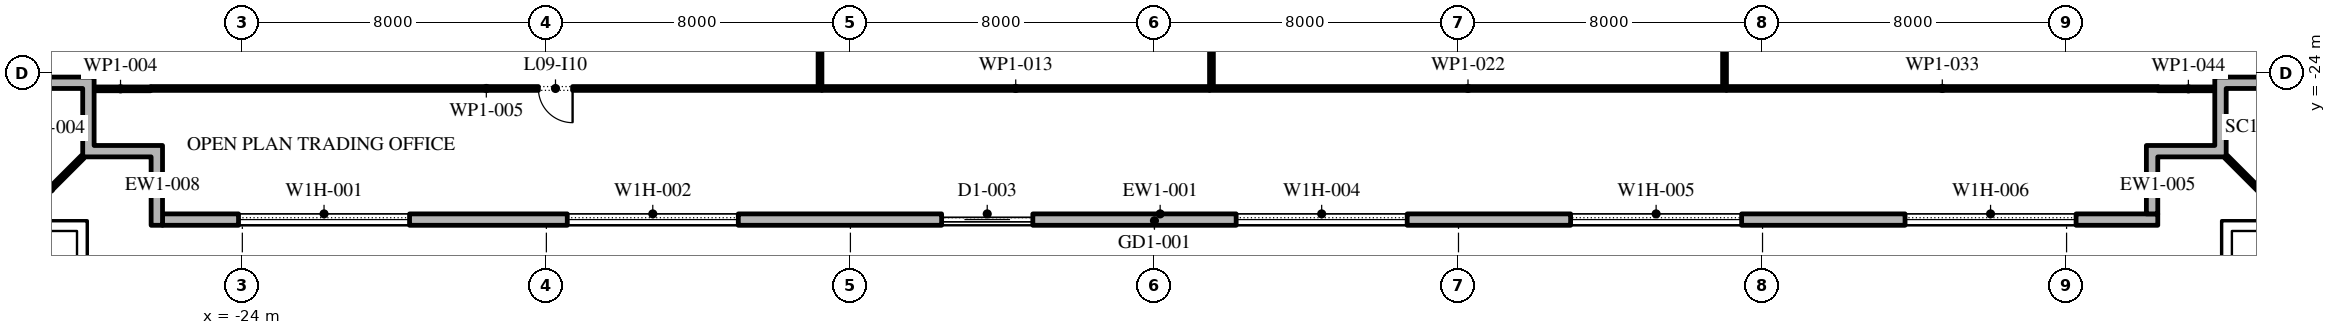
"""IFC4 building model, lengths in metres.
Left out: names, types, materials, properties, quantities, classifications, styles, units other than length and angle.
Written with IfcOpenShell. Run it as: python <this file> out.ifc"""

import sys

from ifc_helpers import new_model, si_unit, direction, frame, frame_2d, origin, place, context, subcontext, project, spatial, polyline, rectangle, outline, extrude, element, fill, save


model = new_model("IFC4")
c1 = context("Model", 3, precision=1e-05, world=origin(), true_north=direction((0.0, 1.0)))
c2 = subcontext(c1, "Body", "Model", "MODEL_VIEW")
j1 = project(units=[si_unit("LENGTHUNIT", "METRE"), si_unit("PLANEANGLEUNIT", "RADIAN")], contexts=[c1])
p1 = place(None, origin())
s1 = spatial("IfcSite", under=j1, at=p1, CompositionType="ELEMENT")
p2 = place(p1, origin())
s2 = spatial("IfcBuilding", under=s1, at=p2, CompositionType="ELEMENT")
p3 = place(p2, frame((0.0, 0.0, 48.0)))
s3 = spatial("IfcBuildingStorey", under=s2, at=p3, CompositionType="ELEMENT", Elevation=48.0)
p4 = place(p3, frame((-26.1, -27.85, 0.0), z_axis=(0.0, 0.0, 1.0), x_axis=(1.0, 0.0, 0.0)))
e1 = element("IfcWall", 1, at=p4, inside=s3, PredefinedType="STANDARD", context=c2, shape_type="SweptSolid", body=[
    extrude(rectangle(XDim=52.5, YDim=0.3, at=frame_2d((26.25, 0.0))), origin(), (0.0, 0.0, 1.0), 4.0),
])
p5 = place(p4, frame((2.0, 0.0, 0.45)))
e2 = element("IfcOpeningElement", 2, at=p5, cuts=e1, PredefinedType="OPENING", context=c2, shape_type="SweptSolid", body=[
    extrude(rectangle(XDim=4.5, YDim=2.75, at=frame_2d((2.25, 1.375))), frame((0.0, 0.16, 0.0), z_axis=(0.0, -1.0, 0.0), x_axis=(1.0, 0.0, 0.0)), (0.0, 0.0, 1.0), 0.32),
])
p6 = place(p4, frame((10.65, 0.0, 0.45)))
e3 = element("IfcOpeningElement", 3, at=p6, cuts=e1, PredefinedType="OPENING", context=c2, shape_type="SweptSolid", body=[
    extrude(rectangle(XDim=4.5, YDim=2.75, at=frame_2d((2.25, 1.375))), frame((0.0, 0.16, 0.0), z_axis=(0.0, -1.0, 0.0), x_axis=(1.0, 0.0, 0.0)), (0.0, 0.0, 1.0), 0.32),
])
p7 = place(p4, frame((20.5, 0.0, 0.0)))
e4 = element("IfcOpeningElement", 4, at=p7, cuts=e1, PredefinedType="OPENING", context=c2, shape_type="SweptSolid", body=[
    extrude(rectangle(XDim=2.4, YDim=3.5, at=frame_2d((1.2, 1.75))), frame((0.0, 0.16, 0.0), z_axis=(0.0, -1.0, 0.0), x_axis=(1.0, 0.0, 0.0)), (0.0, 0.0, 1.0), 0.32),
])
p8 = place(p4, frame((28.25, 0.0, 0.45)))
e5 = element("IfcOpeningElement", 5, at=p8, cuts=e1, PredefinedType="OPENING", context=c2, shape_type="SweptSolid", body=[
    extrude(rectangle(XDim=4.5, YDim=2.75, at=frame_2d((2.25, 1.375))), frame((0.0, 0.16, 0.0), z_axis=(0.0, -1.0, 0.0), x_axis=(1.0, 0.0, 0.0)), (0.0, 0.0, 1.0), 0.32),
])
p9 = place(p4, frame((37.05, 0.0, 0.45)))
e6 = element("IfcOpeningElement", 6, at=p9, cuts=e1, PredefinedType="OPENING", context=c2, shape_type="SweptSolid", body=[
    extrude(rectangle(XDim=4.5, YDim=2.75, at=frame_2d((2.25, 1.375))), frame((0.0, 0.16, 0.0), z_axis=(0.0, -1.0, 0.0), x_axis=(1.0, 0.0, 0.0)), (0.0, 0.0, 1.0), 0.32),
])
p10 = place(p4, frame((45.85, 0.0, 0.45)))
e7 = element("IfcOpeningElement", 7, at=p10, cuts=e1, PredefinedType="OPENING", context=c2, shape_type="SweptSolid", body=[
    extrude(rectangle(XDim=4.5, YDim=2.75, at=frame_2d((2.25, 1.375))), frame((0.0, 0.16, 0.0), z_axis=(0.0, -1.0, 0.0), x_axis=(1.0, 0.0, 0.0)), (0.0, 0.0, 1.0), 0.32),
])
p11 = place(p3, origin())
e8 = element("IfcWall", 8, at=p11, inside=s3, PredefinedType="STANDARD", context=c2, shape_type="SweptSolid", body=[
    extrude(outline(polyline([(27.9, -25.9), (27.9, -24.1), (30.0, -24.1), (30.0, -24.4), (28.2, -24.4), (28.2, -26.2), (26.4, -26.2), (26.4, -27.7), (26.1, -27.7), (26.1, -25.9), (27.9, -25.9)])), origin(), (0.0, 0.0, 1.0), 4.0),
])
p12 = place(p3, origin())
e9 = element("IfcWall", 9, at=p12, inside=s3, PredefinedType="STANDARD", context=c2, shape_type="SweptSolid", body=[
    extrude(outline(polyline([(-26.4, -26.2), (-28.2, -26.2), (-28.2, -24.4), (-29.7, -24.4), (-29.7, -24.1), (-27.9, -24.1), (-27.9, -25.9), (-26.1, -25.9), (-26.1, -28.0), (-26.4, -28.0), (-26.4, -26.2)])), origin(), (0.0, 0.0, 1.0), 4.0),
])
for number, where, z_axis, x_axis in (
    (10, (28.2, -26.2, -0.05), (0.0, 0.0, 1.0), (0.707, -0.707, 0.0)),
    (11, (-28.2, -26.2, -0.05), (0.0, 0.0, 1.0), (-0.707, -0.707, 0.0)),
):
    element("IfcWall", number, at=place(p3, frame(where, z_axis=z_axis, x_axis=x_axis)), inside=s3, PredefinedType="STANDARD", context=c2, shape_type="SweptSolid", body=[
        extrude(rectangle(XDim=2.385, YDim=0.1, at=frame_2d((1.192, 0.0))), origin(), (0.0, 0.0, 1.0), 4.05),
    ])
p13 = place(p3, frame((-28.0, -24.41, 0.0), z_axis=(0.0, 0.0, 1.0), x_axis=(1.0, 0.0, 0.0)))
e12 = element("IfcWall", 12, at=p13, inside=s3, PredefinedType="PARTITIONING", context=c2, shape_type="SweptSolid", body=[
    extrude(rectangle(XDim=1.59, YDim=0.1, at=frame_2d((0.795, 0.0))), origin(), (0.0, 0.0, 1.0), 4.0),
])
p14 = place(p3, frame((-26.41, -24.4, 0.0), z_axis=(0.0, 0.0, 1.0), x_axis=(1.0, 0.0, 0.0)))
e13 = element("IfcWall", 13, at=p14, inside=s3, PredefinedType="PARTITIONING", context=c2, shape_type="SweptSolid", body=[
    extrude(rectangle(XDim=17.66, YDim=0.1, at=frame_2d((8.83, 0.0))), origin(), (0.0, 0.0, 1.0), 4.0),
])
p15 = place(p14, frame((10.2, 0.0, 0.0)))
e14 = element("IfcOpeningElement", 14, at=p15, cuts=e13, PredefinedType="OPENING", context=c2, shape_type="SweptSolid", body=[
    extrude(rectangle(XDim=0.9, YDim=2.1, at=frame_2d((0.45, 1.05))), frame((0.0, 0.06, 0.0), z_axis=(0.0, -1.0, 0.0), x_axis=(1.0, 0.0, 0.0)), (0.0, 0.0, 1.0), 0.12),
])
p16 = place(p3, frame((-8.75, -24.4, 0.0), z_axis=(0.0, 0.0, 1.0), x_axis=(1.0, 0.0, 0.0)))
e15 = element("IfcWall", 15, at=p16, inside=s3, PredefinedType="PARTITIONING", context=c2, shape_type="SweptSolid", body=[
    extrude(rectangle(XDim=10.2, YDim=0.1, at=frame_2d((5.1, 0.0))), origin(), (0.0, 0.0, 1.0), 4.0),
])
p17 = place(p3, frame((-8.8, -17.675, 0.0), z_axis=(0.0, 0.0, 1.0), x_axis=(0.0, -1.0, 0.0)))
e16 = element("IfcWall", 16, at=p17, inside=s3, PredefinedType="PARTITIONING", context=c2, shape_type="SweptSolid", body=[
    extrude(rectangle(XDim=6.675, YDim=0.1, at=frame_2d((3.337, 0.0))), origin(), (0.0, 0.0, 1.0), 4.0),
])
p18 = place(p3, frame((1.45, -24.4, 0.0), z_axis=(0.0, 0.0, 1.0), x_axis=(1.0, 0.0, 0.0)))
e17 = element("IfcWall", 17, at=p18, inside=s3, PredefinedType="PARTITIONING", context=c2, shape_type="SweptSolid", body=[
    extrude(rectangle(XDim=13.6, YDim=0.1, at=frame_2d((6.8, 0.0))), origin(), (0.0, 0.0, 1.0), 4.0),
])
p19 = place(p3, frame((1.5, -17.34, 0.0), z_axis=(0.0, 0.0, 1.0), x_axis=(0.0, -1.0, 0.0)))
e18 = element("IfcWall", 18, at=p19, inside=s3, PredefinedType="PARTITIONING", context=c2, shape_type="SweptSolid", body=[
    extrude(rectangle(XDim=7.01, YDim=0.1, at=frame_2d((3.505, 0.0))), origin(), (0.0, 0.0, 1.0), 4.0),
])
p20 = place(p3, frame((15.05, -24.4, 0.0), z_axis=(0.0, 0.0, 1.0), x_axis=(1.0, 0.0, 0.0)))
e19 = element("IfcWall", 19, at=p20, inside=s3, PredefinedType="PARTITIONING", context=c2, shape_type="SweptSolid", body=[
    extrude(rectangle(XDim=11.36, YDim=0.1, at=frame_2d((5.68, 0.0))), origin(), (0.0, 0.0, 1.0), 4.0),
])
p21 = place(p3, frame((15.0, -17.675, 0.0), z_axis=(0.0, 0.0, 1.0), x_axis=(0.0, -1.0, 0.0)))
e20 = element("IfcWall", 20, at=p21, inside=s3, PredefinedType="PARTITIONING", context=c2, shape_type="SweptSolid", body=[
    extrude(rectangle(XDim=6.675, YDim=0.1, at=frame_2d((3.337, 0.0))), origin(), (0.0, 0.0, 1.0), 4.0),
])
p22 = place(p3, frame((26.41, -24.41, 0.0), z_axis=(0.0, 0.0, 1.0), x_axis=(1.0, 0.0, 0.0)))
e21 = element("IfcWall", 21, at=p22, inside=s3, PredefinedType="PARTITIONING", context=c2, shape_type="SweptSolid", body=[
    extrude(rectangle(XDim=1.59, YDim=0.1, at=frame_2d((0.795, 0.0))), origin(), (0.0, 0.0, 1.0), 4.0),
])
p23 = place(p5, origin())
e22 = element("IfcWindow", 22, at=p23, inside=s3, PartitioningType="DOUBLE_PANEL_VERTICAL", PredefinedType="WINDOW", context=c2, shape_type="SweptSolid", body=[
    extrude(rectangle(XDim=4.5, YDim=2.75, at=frame_2d((2.25, 1.375))), frame((0.0, 0.03, 0.0), z_axis=(0.0, -1.0, 0.0), x_axis=(1.0, 0.0, 0.0)), (0.0, 0.0, 1.0), 0.06),
])
fill(e2, e22)
p24 = place(p6, origin())
e23 = element("IfcWindow", 23, at=p24, inside=s3, PartitioningType="DOUBLE_PANEL_VERTICAL", PredefinedType="WINDOW", context=c2, shape_type="SweptSolid", body=[
    extrude(rectangle(XDim=4.5, YDim=2.75, at=frame_2d((2.25, 1.375))), frame((0.0, 0.03, 0.0), z_axis=(0.0, -1.0, 0.0), x_axis=(1.0, 0.0, 0.0)), (0.0, 0.0, 1.0), 0.06),
])
fill(e3, e23)
p25 = place(p7, origin())
e24 = element("IfcDoor", 24, at=p25, inside=s3, OperationType="DOUBLE_DOOR_SLIDING", PredefinedType="DOOR", context=c2, shape_type="SweptSolid", body=[
    extrude(rectangle(XDim=2.4, YDim=3.5, at=frame_2d((1.2, 1.75))), frame((0.0, 0.025, 0.0), z_axis=(0.0, -1.0, 0.0), x_axis=(1.0, 0.0, 0.0)), (0.0, 0.0, 1.0), 0.05),
])
fill(e4, e24)
p26 = place(p8, origin())
e25 = element("IfcWindow", 25, at=p26, inside=s3, PartitioningType="DOUBLE_PANEL_VERTICAL", PredefinedType="WINDOW", context=c2, shape_type="SweptSolid", body=[
    extrude(rectangle(XDim=4.5, YDim=2.75, at=frame_2d((2.25, 1.375))), frame((0.0, 0.03, 0.0), z_axis=(0.0, -1.0, 0.0), x_axis=(1.0, 0.0, 0.0)), (0.0, 0.0, 1.0), 0.06),
])
fill(e5, e25)
p27 = place(p9, origin())
e26 = element("IfcWindow", 26, at=p27, inside=s3, PartitioningType="DOUBLE_PANEL_VERTICAL", PredefinedType="WINDOW", context=c2, shape_type="SweptSolid", body=[
    extrude(rectangle(XDim=4.5, YDim=2.75, at=frame_2d((2.25, 1.375))), frame((0.0, 0.03, 0.0), z_axis=(0.0, -1.0, 0.0), x_axis=(1.0, 0.0, 0.0)), (0.0, 0.0, 1.0), 0.06),
])
fill(e6, e26)
p28 = place(p10, origin())
e27 = element("IfcWindow", 27, at=p28, inside=s3, PartitioningType="DOUBLE_PANEL_VERTICAL", PredefinedType="WINDOW", context=c2, shape_type="SweptSolid", body=[
    extrude(rectangle(XDim=4.5, YDim=2.75, at=frame_2d((2.25, 1.375))), frame((0.0, 0.03, 0.0), z_axis=(0.0, -1.0, 0.0), x_axis=(1.0, 0.0, 0.0)), (0.0, 0.0, 1.0), 0.06),
])
fill(e7, e27)
p29 = place(p15, frame((0.9, 0.0, 0.0), z_axis=(0.0, 0.0, 1.0), x_axis=(-1.0, 0.0, 0.0)))
e28 = element("IfcDoor", 28, at=p29, inside=s3, OperationType="SINGLE_SWING_RIGHT", PredefinedType="DOOR", context=c2, shape_type="SweptSolid", body=[
    extrude(rectangle(XDim=0.9, YDim=2.1, at=frame_2d((0.45, 1.05))), frame((0.0, 0.025, 0.0), z_axis=(0.0, -1.0, 0.0), x_axis=(1.0, 0.0, 0.0)), (0.0, 0.0, 1.0), 0.05),
])
fill(e14, e28)
save(model, sys.argv[1])
